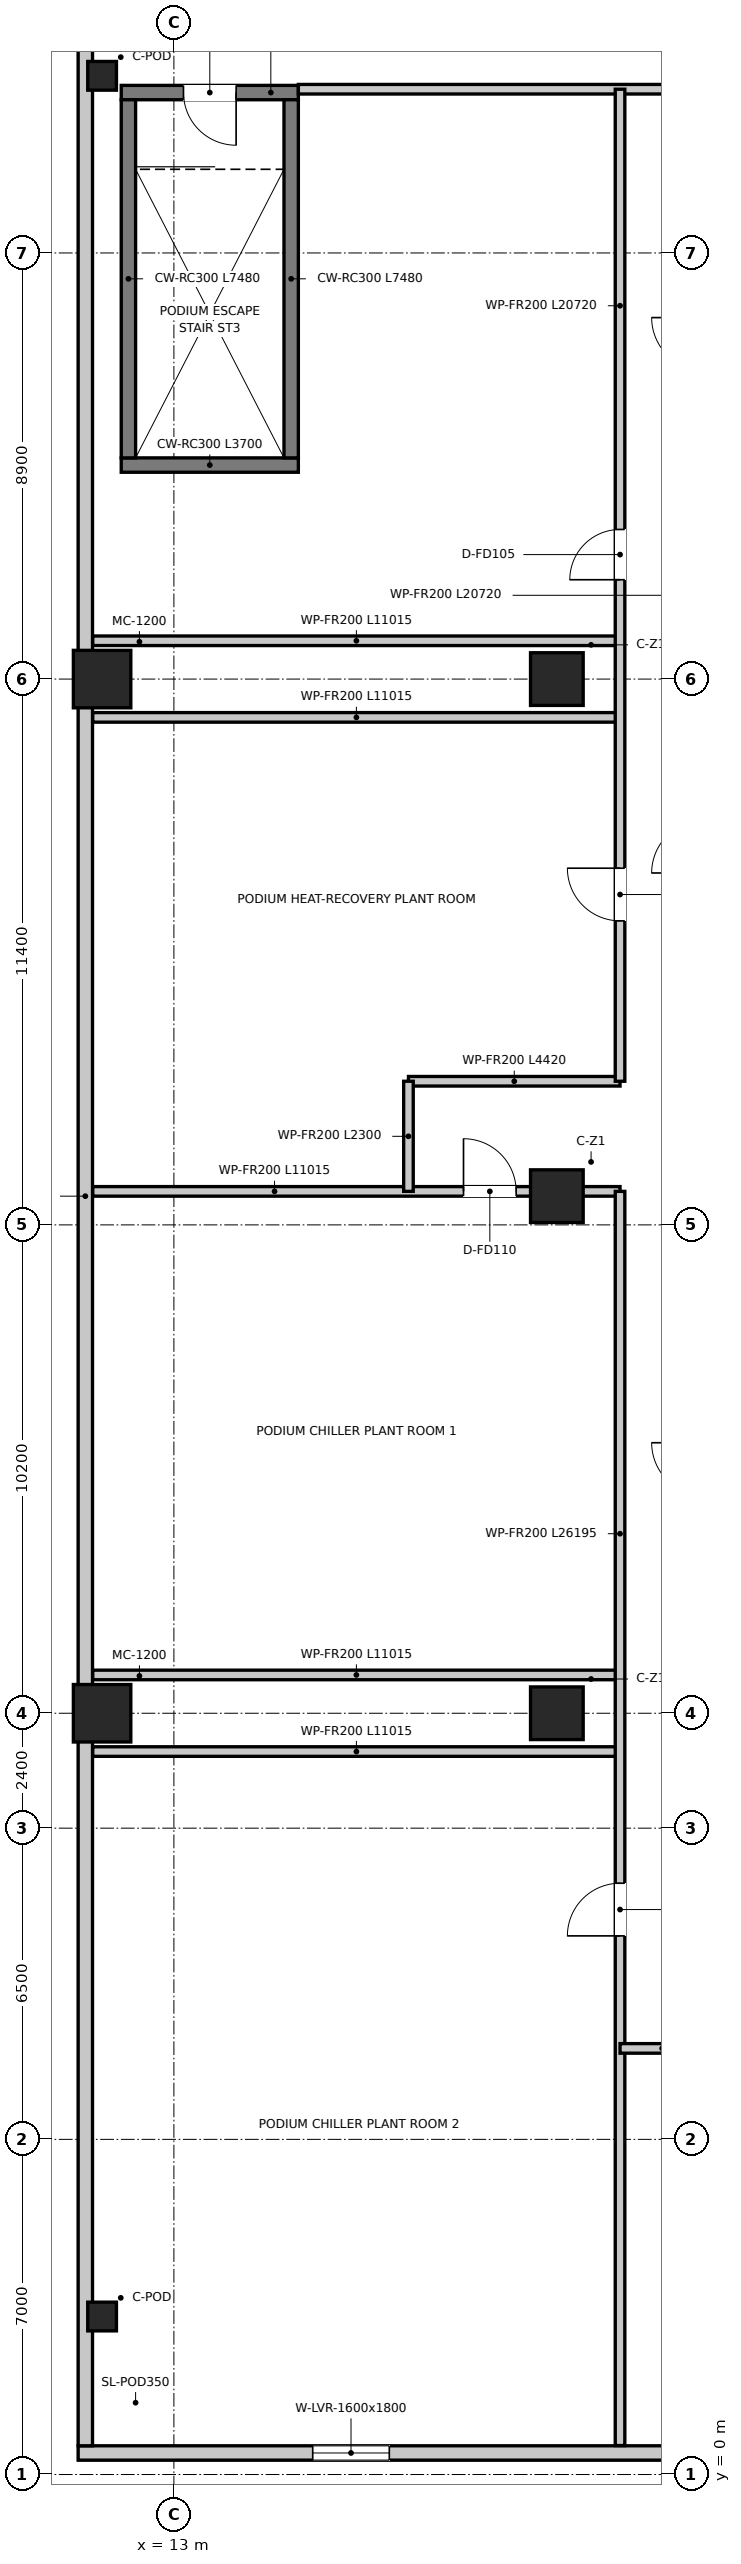
"""IFC4 building model, lengths in metres.
Left out: names, types, materials, properties, quantities, classifications, styles, units other than length and angle.
Written with IfcOpenShell. Run it as: python <this file> out.ifc"""

import sys

from ifc_helpers import new_model, si_unit, direction, frame, frame_2d, origin, origin_2d, place, context, subcontext, project, spatial, rectangle, extrude, source, transform, mapped, element, fill, save


model = new_model("IFC4")
c1 = context("Model", 3, precision=1e-05, world=origin(), true_north=direction((0.0, 1.0)))
c2 = subcontext(c1, "Body", "Model", "MODEL_VIEW")
j1 = project(units=[si_unit("LENGTHUNIT", "METRE"), si_unit("PLANEANGLEUNIT", "RADIAN")], contexts=[c1])
p1 = place(None, origin())
s1 = spatial("IfcSite", under=j1, at=p1, CompositionType="ELEMENT")
p2 = place(p1, origin())
s2 = spatial("IfcBuilding", under=s1, at=p2, CompositionType="ELEMENT")
p3 = place(p2, frame((0.0, 0.0, 20.0)))
s3 = spatial("IfcBuildingStorey", under=s2, at=p3, CompositionType="ELEMENT", Elevation=20.0)
p4 = place(p3, frame((11.9, 41.97, 0.0), z_axis=(0.0, 0.0, 1.0), x_axis=(1.0, 0.0, 0.0)))
e1 = element("IfcWall", 1, at=p4, inside=s3, PredefinedType="SHEAR", context=c2, shape_type="SweptSolid", body=[
    extrude(rectangle(XDim=3.7, YDim=0.3, at=frame_2d((1.85, 0.0))), origin(), (0.0, 0.0, 1.0), 5.0),
])
p5 = place(p3, frame((15.6, 49.75, 0.0), z_axis=(0.0, 0.0, 1.0), x_axis=(-1.0, 0.0, 0.0)))
e2 = element("IfcWall", 2, at=p5, inside=s3, PredefinedType="SHEAR", context=c2, shape_type="SweptSolid", body=[
    extrude(rectangle(XDim=3.7, YDim=0.3, at=frame_2d((1.85, 0.0))), origin(), (0.0, 0.0, 1.0), 5.0),
])
p6 = place(p5, frame((1.3, 0.0, 0.0)))
e3 = element("IfcOpeningElement", 3, at=p6, cuts=e2, PredefinedType="OPENING", context=c2, shape_type="SweptSolid", body=[
    extrude(rectangle(XDim=1.1, YDim=2.15, at=frame_2d((0.55, 1.075))), frame((0.0, 0.16, 0.0), z_axis=(0.0, -1.0, 0.0), x_axis=(1.0, 0.0, 0.0)), (0.0, 0.0, 1.0), 0.32),
])
for number, where, z_axis, x_axis in (
    (4, (12.05, 42.12, 0.0), (0.0, 0.0, 1.0), (0.0, 1.0, 0.0)),
    (5, (15.45, 42.12, 0.0), (0.0, 0.0, 1.0), (0.0, 1.0, 0.0)),
):
    element("IfcWall", number, at=place(p3, frame(where, z_axis=z_axis, x_axis=x_axis)), inside=s3, PredefinedType="SHEAR", context=c2, shape_type="SweptSolid", body=[
        extrude(rectangle(XDim=7.48, YDim=0.3, at=frame_2d((3.74, 0.0))), origin(), (0.0, 0.0, 1.0), 5.0),
    ])
m1 = source(origin(), c2, "Body", "SweptSolid", [
    extrude(rectangle(XDim=1.1, YDim=1.1, at=origin_2d()), origin(), (0.0, 0.0, 1.0), 5.0),
])
for number, where, z_axis, x_axis in (
    (6, (21.0, 15.9, 0.0), (0.0, 0.0, 1.0), (1.0, 0.0, 0.0)),
    (7, (21.0, 26.7, 0.0), (0.0, 0.0, 1.0), (1.0, 0.0, 0.0)),
    (8, (21.0, 37.5, 0.0), (0.0, 0.0, 1.0), (1.0, 0.0, 0.0)),
):
    element("IfcColumn", number, at=place(p3, frame(where, z_axis=z_axis, x_axis=x_axis)), inside=s3, PredefinedType="COLUMN", context=c2, shape_type="MappedRepresentation", body=[
        mapped(m1, transform((0.0, 0.0, 0.0), x_axis=(1.0, 0.0, 0.0), y_axis=(0.0, 1.0, 0.0), z_axis=(0.0, 0.0, 1.0), scale=1.0)),
    ])
m2 = source(origin(), c2, "Body", "SweptSolid", [
    extrude(rectangle(XDim=1.2, YDim=1.2, at=origin_2d()), origin(), (0.0, 0.0, 1.0), 5.0),
])
for number, where, z_axis, x_axis in (
    (9, (11.5, 15.9, 0.0), (0.0, 0.0, 1.0), (1.0, 0.0, 0.0)),
    (10, (11.5, 37.5, 0.0), (0.0, 0.0, 1.0), (1.0, 0.0, 0.0)),
):
    element("IfcColumn", number, at=place(p3, frame(where, z_axis=z_axis, x_axis=x_axis)), inside=s3, PredefinedType="USERDEFINED", context=c2, shape_type="MappedRepresentation", body=[
        mapped(m2, transform((0.0, 0.0, 0.0), x_axis=(1.0, 0.0, 0.0), y_axis=(0.0, 1.0, 0.0), z_axis=(0.0, 0.0, 1.0), scale=1.0)),
    ])
m3 = source(origin(), c2, "Body", "SweptSolid", [
    extrude(rectangle(XDim=0.6, YDim=0.6, at=origin_2d()), origin(), (0.0, 0.0, 1.0), 5.0),
])
for number, where, z_axis, x_axis in (
    (11, (11.5, 50.1, 0.0), (0.0, 0.0, 1.0), (1.0, 0.0, 0.0)),
    (12, (11.5, 3.3, 0.0), (0.0, 0.0, 1.0), (1.0, 0.0, 0.0)),
):
    element("IfcColumn", number, at=place(p3, frame(where, z_axis=z_axis, x_axis=x_axis)), inside=s3, PredefinedType="COLUMN", context=c2, shape_type="MappedRepresentation", body=[
        mapped(m3, transform((0.0, 0.0, 0.0), x_axis=(1.0, 0.0, 0.0), y_axis=(0.0, 1.0, 0.0), z_axis=(0.0, 0.0, 1.0), scale=1.0)),
    ])
p7 = place(p3, frame((61.0, 0.45, 0.0), z_axis=(0.0, 0.0, 1.0), x_axis=(-1.0, 0.0, 0.0)))
e13 = element("IfcWall", 13, at=p7, inside=s3, PredefinedType="SOLIDWALL", context=c2, shape_type="SweptSolid", body=[
    extrude(rectangle(XDim=50.0, YDim=0.3, at=frame_2d((25.0, 0.0))), origin(), (0.0, 0.0, 1.0), 4.72),
])
p8 = place(p7, frame((43.5, 0.0, 1.2)))
e14 = element("IfcOpeningElement", 14, at=p8, cuts=e13, PredefinedType="OPENING", context=c2, shape_type="SweptSolid", body=[
    extrude(rectangle(XDim=1.6, YDim=1.8, at=frame_2d((0.8, 0.9))), frame((0.0, 0.16, 0.0), z_axis=(0.0, -1.0, 0.0), x_axis=(1.0, 0.0, 0.0)), (0.0, 0.0, 1.0), 0.32),
])
p9 = place(p7, frame((34.5, 0.0, 1.2)))
e15 = element("IfcOpeningElement", 15, at=p9, cuts=e13, PredefinedType="OPENING", context=c2, shape_type="SweptSolid", body=[
    extrude(rectangle(XDim=1.6, YDim=1.8, at=frame_2d((0.8, 0.9))), frame((0.0, 0.16, 0.0), z_axis=(0.0, -1.0, 0.0), x_axis=(1.0, 0.0, 0.0)), (0.0, 0.0, 1.0), 0.32),
])
p10 = place(p7, frame((28.0, 0.0, 1.2)))
e16 = element("IfcOpeningElement", 16, at=p10, cuts=e13, PredefinedType="OPENING", context=c2, shape_type="SweptSolid", body=[
    extrude(rectangle(XDim=1.6, YDim=1.8, at=frame_2d((0.8, 0.9))), frame((0.0, 0.16, 0.0), z_axis=(0.0, -1.0, 0.0), x_axis=(1.0, 0.0, 0.0)), (0.0, 0.0, 1.0), 0.32),
])
p11 = place(p7, frame((20.0, 0.0, 1.2)))
e17 = element("IfcOpeningElement", 17, at=p11, cuts=e13, PredefinedType="OPENING", context=c2, shape_type="SweptSolid", body=[
    extrude(rectangle(XDim=1.6, YDim=1.8, at=frame_2d((0.8, 0.9))), frame((0.0, 0.16, 0.0), z_axis=(0.0, -1.0, 0.0), x_axis=(1.0, 0.0, 0.0)), (0.0, 0.0, 1.0), 0.32),
])
p12 = place(p7, frame((10.5, 0.0, 1.2)))
e18 = element("IfcOpeningElement", 18, at=p12, cuts=e13, PredefinedType="OPENING", context=c2, shape_type="SweptSolid", body=[
    extrude(rectangle(XDim=1.6, YDim=1.8, at=frame_2d((0.8, 0.9))), frame((0.0, 0.16, 0.0), z_axis=(0.0, -1.0, 0.0), x_axis=(1.0, 0.0, 0.0)), (0.0, 0.0, 1.0), 0.32),
])
p13 = place(p3, frame((11.15, 0.6, 0.0), z_axis=(0.0, 0.0, 1.0), x_axis=(0.0, 1.0, 0.0)))
e19 = element("IfcWall", 19, at=p13, inside=s3, PredefinedType="SOLIDWALL", context=c2, shape_type="SweptSolid", body=[
    extrude(rectangle(XDim=52.2, YDim=0.3, at=frame_2d((26.1, 0.0))), origin(), (0.0, 0.0, 1.0), 2.3),
])
p14 = place(p3, frame((11.305, 26.8, 0.0), z_axis=(0.0, 0.0, 1.0), x_axis=(1.0, 0.0, 0.0)))
e20 = element("IfcWall", 20, at=p14, inside=s3, PredefinedType="PARTITIONING", context=c2, shape_type="SweptSolid", body=[
    extrude(rectangle(XDim=11.015, YDim=0.2, at=frame_2d((5.508, 0.0))), origin(), (0.0, 0.0, 1.0), 2.92),
])
p15 = place(p14, frame((7.745, 0.0, 0.0)))
e21 = element("IfcOpeningElement", 21, at=p15, cuts=e20, PredefinedType="OPENING", context=c2, shape_type="SweptSolid", body=[
    extrude(rectangle(XDim=1.1, YDim=2.15, at=frame_2d((0.55, 1.075))), frame((0.0, 0.11, 0.0), z_axis=(0.0, -1.0, 0.0), x_axis=(1.0, 0.0, 0.0)), (0.0, 0.0, 1.0), 0.22),
])
p16 = place(p3, frame((11.305, 15.1, 0.0), z_axis=(0.0, 0.0, 1.0), x_axis=(1.0, 0.0, 0.0)))
e22 = element("IfcWall", 22, at=p16, inside=s3, PredefinedType="PARTITIONING", context=c2, shape_type="SweptSolid", body=[
    extrude(rectangle(XDim=11.015, YDim=0.2, at=frame_2d((5.508, 0.0))), origin(), (0.0, 0.0, 1.0), 4.03),
])
for number, where, z_axis, x_axis in (
    (23, (11.305, 16.7, 0.0), (0.0, 0.0, 1.0), (1.0, 0.0, 0.0)),
    (24, (11.305, 36.7, 0.0), (0.0, 0.0, 1.0), (1.0, 0.0, 0.0)),
):
    element("IfcWall", number, at=place(p3, frame(where, z_axis=z_axis, x_axis=x_axis)), inside=s3, PredefinedType="PARTITIONING", context=c2, shape_type="SweptSolid", body=[
        extrude(rectangle(XDim=11.015, YDim=0.2, at=frame_2d((5.508, 0.0))), origin(), (0.0, 0.0, 1.0), 2.92),
    ])
p17 = place(p3, frame((11.305, 38.3, 0.0), z_axis=(0.0, 0.0, 1.0), x_axis=(1.0, 0.0, 0.0)))
e25 = element("IfcWall", 25, at=p17, inside=s3, PredefinedType="PARTITIONING", context=c2, shape_type="SweptSolid", body=[
    extrude(rectangle(XDim=11.015, YDim=0.2, at=frame_2d((5.508, 0.0))), origin(), (0.0, 0.0, 1.0), 4.03),
])
p18 = place(p3, frame((17.9, 29.1, 0.0), z_axis=(0.0, 0.0, 1.0), x_axis=(1.0, 0.0, 0.0)))
e26 = element("IfcWall", 26, at=p18, inside=s3, PredefinedType="PARTITIONING", context=c2, shape_type="SweptSolid", body=[
    extrude(rectangle(XDim=4.42, YDim=0.2, at=frame_2d((2.21, 0.0))), origin(), (0.0, 0.0, 1.0), 4.03),
])
p19 = place(p3, frame((15.6, 49.82, 0.0), z_axis=(0.0, 0.0, 1.0), x_axis=(1.0, 0.0, 0.0)))
e27 = element("IfcWall", 27, at=p19, inside=s3, PredefinedType="PARTITIONING", context=c2, shape_type="SweptSolid", body=[
    extrude(rectangle(XDim=40.7, YDim=0.2, at=frame_2d((20.35, 0.0))), origin(), (0.0, 0.0, 1.0), 4.03),
])
p20 = place(p19, frame((18.45, 0.0, 0.0)))
e28 = element("IfcOpeningElement", 28, at=p20, cuts=e27, PredefinedType="OPENING", context=c2, shape_type="SweptSolid", body=[
    extrude(rectangle(XDim=1.1, YDim=2.15, at=frame_2d((0.55, 1.075))), frame((0.0, 0.11, 0.0), z_axis=(0.0, -1.0, 0.0), x_axis=(1.0, 0.0, 0.0)), (0.0, 0.0, 1.0), 0.22),
])
p21 = place(p19, frame((25.45, 0.0, 0.0)))
e29 = element("IfcOpeningElement", 29, at=p21, cuts=e27, PredefinedType="OPENING", context=c2, shape_type="SweptSolid", body=[
    extrude(rectangle(XDim=1.1, YDim=2.15, at=frame_2d((0.55, 1.075))), frame((0.0, 0.11, 0.0), z_axis=(0.0, -1.0, 0.0), x_axis=(1.0, 0.0, 0.0)), (0.0, 0.0, 1.0), 0.22),
])
p22 = place(p3, frame((22.32, 0.605, 0.0), z_axis=(0.0, 0.0, 1.0), x_axis=(0.0, 1.0, 0.0)))
e30 = element("IfcWall", 30, at=p22, inside=s3, PredefinedType="PARTITIONING", context=c2, shape_type="SweptSolid", body=[
    extrude(rectangle(XDim=26.195, YDim=0.2, at=frame_2d((13.098, 0.0))), origin(), (0.0, 0.0, 1.0), 4.02),
])
p23 = place(p22, frame((10.645, 0.0, 0.0)))
e31 = element("IfcOpeningElement", 31, at=p23, cuts=e30, PredefinedType="OPENING", context=c2, shape_type="SweptSolid", body=[
    extrude(rectangle(XDim=1.1, YDim=2.15, at=frame_2d((0.55, 1.075))), frame((0.0, 0.11, 0.0), z_axis=(0.0, -1.0, 0.0), x_axis=(1.0, 0.0, 0.0)), (0.0, 0.0, 1.0), 0.22),
])
p24 = place(p3, frame((22.32, 8.9, 0.0), z_axis=(0.0, 0.0, 1.0), x_axis=(1.0, 0.0, 0.0)))
e32 = element("IfcWall", 32, at=p24, inside=s3, PredefinedType="PARTITIONING", context=c2, shape_type="SweptSolid", body=[
    extrude(rectangle(XDim=1.76, YDim=0.2, at=frame_2d((0.88, 0.0))), origin(), (0.0, 0.0, 1.0), 4.72),
])
p25 = place(p3, frame((22.32, 29.1, 0.0), z_axis=(0.0, 0.0, 1.0), x_axis=(0.0, 1.0, 0.0)))
e33 = element("IfcWall", 33, at=p25, inside=s3, PredefinedType="PARTITIONING", context=c2, shape_type="SweptSolid", body=[
    extrude(rectangle(XDim=20.72, YDim=0.2, at=frame_2d((10.36, 0.0))), origin(), (0.0, 0.0, 1.0), 4.02),
])
p26 = place(p25, frame((3.35, 0.0, 0.0)))
e34 = element("IfcOpeningElement", 34, at=p26, cuts=e33, PredefinedType="OPENING", context=c2, shape_type="SweptSolid", body=[
    extrude(rectangle(XDim=1.1, YDim=2.15, at=frame_2d((0.55, 1.075))), frame((0.0, 0.11, 0.0), z_axis=(0.0, -1.0, 0.0), x_axis=(1.0, 0.0, 0.0)), (0.0, 0.0, 1.0), 0.22),
])
p27 = place(p25, frame((10.475, 0.0, 0.0)))
e35 = element("IfcOpeningElement", 35, at=p27, cuts=e33, PredefinedType="OPENING", context=c2, shape_type="SweptSolid", body=[
    extrude(rectangle(XDim=1.05, YDim=2.1, at=frame_2d((0.525, 1.05))), frame((0.0, 0.11, 0.0), z_axis=(0.0, -1.0, 0.0), x_axis=(1.0, 0.0, 0.0)), (0.0, 0.0, 1.0), 0.22),
])
p28 = place(p3, frame((17.9, 26.8, 0.0), z_axis=(0.0, 0.0, 1.0), x_axis=(0.0, 1.0, 0.0)))
e36 = element("IfcWall", 36, at=p28, inside=s3, PredefinedType="PARTITIONING", context=c2, shape_type="SweptSolid", body=[
    extrude(rectangle(XDim=2.3, YDim=0.2, at=frame_2d((1.15, 0.0))), origin(), (0.0, 0.0, 1.0), 3.92),
])
p29 = place(p8, origin())
e37 = element("IfcWindow", 37, at=p29, inside=s3, PartitioningType="SINGLE_PANEL", PredefinedType="WINDOW", context=c2, shape_type="SweptSolid", body=[
    extrude(rectangle(XDim=1.6, YDim=1.8, at=frame_2d((0.8, 0.9))), frame((0.0, 0.03, 0.0), z_axis=(0.0, -1.0, 0.0), x_axis=(1.0, 0.0, 0.0)), (0.0, 0.0, 1.0), 0.06),
])
fill(e14, e37)
p30 = place(p6, origin())
e38 = element("IfcDoor", 38, at=p30, inside=s3, OperationType="SINGLE_SWING_LEFT", PredefinedType="DOOR", context=c2, shape_type="SweptSolid", body=[
    extrude(rectangle(XDim=1.1, YDim=2.15, at=frame_2d((0.55, 1.075))), frame((0.0, 0.025, 0.0), z_axis=(0.0, -1.0, 0.0), x_axis=(1.0, 0.0, 0.0)), (0.0, 0.0, 1.0), 0.05),
])
fill(e3, e38)
p31 = place(p15, origin())
e39 = element("IfcDoor", 39, at=p31, inside=s3, OperationType="SINGLE_SWING_LEFT", PredefinedType="DOOR", context=c2, shape_type="SweptSolid", body=[
    extrude(rectangle(XDim=1.1, YDim=2.15, at=frame_2d((0.55, 1.075))), frame((0.0, 0.025, 0.0), z_axis=(0.0, -1.0, 0.0), x_axis=(1.0, 0.0, 0.0)), (0.0, 0.0, 1.0), 0.05),
])
fill(e21, e39)
p32 = place(p23, origin())
e40 = element("IfcDoor", 40, at=p32, inside=s3, OperationType="SINGLE_SWING_LEFT", PredefinedType="DOOR", context=c2, shape_type="SweptSolid", body=[
    extrude(rectangle(XDim=1.1, YDim=2.15, at=frame_2d((0.55, 1.075))), frame((0.0, 0.025, 0.0), z_axis=(0.0, -1.0, 0.0), x_axis=(1.0, 0.0, 0.0)), (0.0, 0.0, 1.0), 0.05),
])
fill(e31, e40)
p33 = place(p26, origin())
e41 = element("IfcDoor", 41, at=p33, inside=s3, OperationType="SINGLE_SWING_RIGHT", PredefinedType="DOOR", context=c2, shape_type="SweptSolid", body=[
    extrude(rectangle(XDim=1.1, YDim=2.15, at=frame_2d((0.55, 1.075))), frame((0.0, 0.025, 0.0), z_axis=(0.0, -1.0, 0.0), x_axis=(1.0, 0.0, 0.0)), (0.0, 0.0, 1.0), 0.05),
])
fill(e34, e41)
p34 = place(p27, origin())
e42 = element("IfcDoor", 42, at=p34, inside=s3, OperationType="SINGLE_SWING_LEFT", PredefinedType="DOOR", context=c2, shape_type="SweptSolid", body=[
    extrude(rectangle(XDim=1.05, YDim=2.1, at=frame_2d((0.525, 1.05))), frame((0.0, 0.025, 0.0), z_axis=(0.0, -1.0, 0.0), x_axis=(1.0, 0.0, 0.0)), (0.0, 0.0, 1.0), 0.05),
])
fill(e35, e42)
save(model, sys.argv[1])
